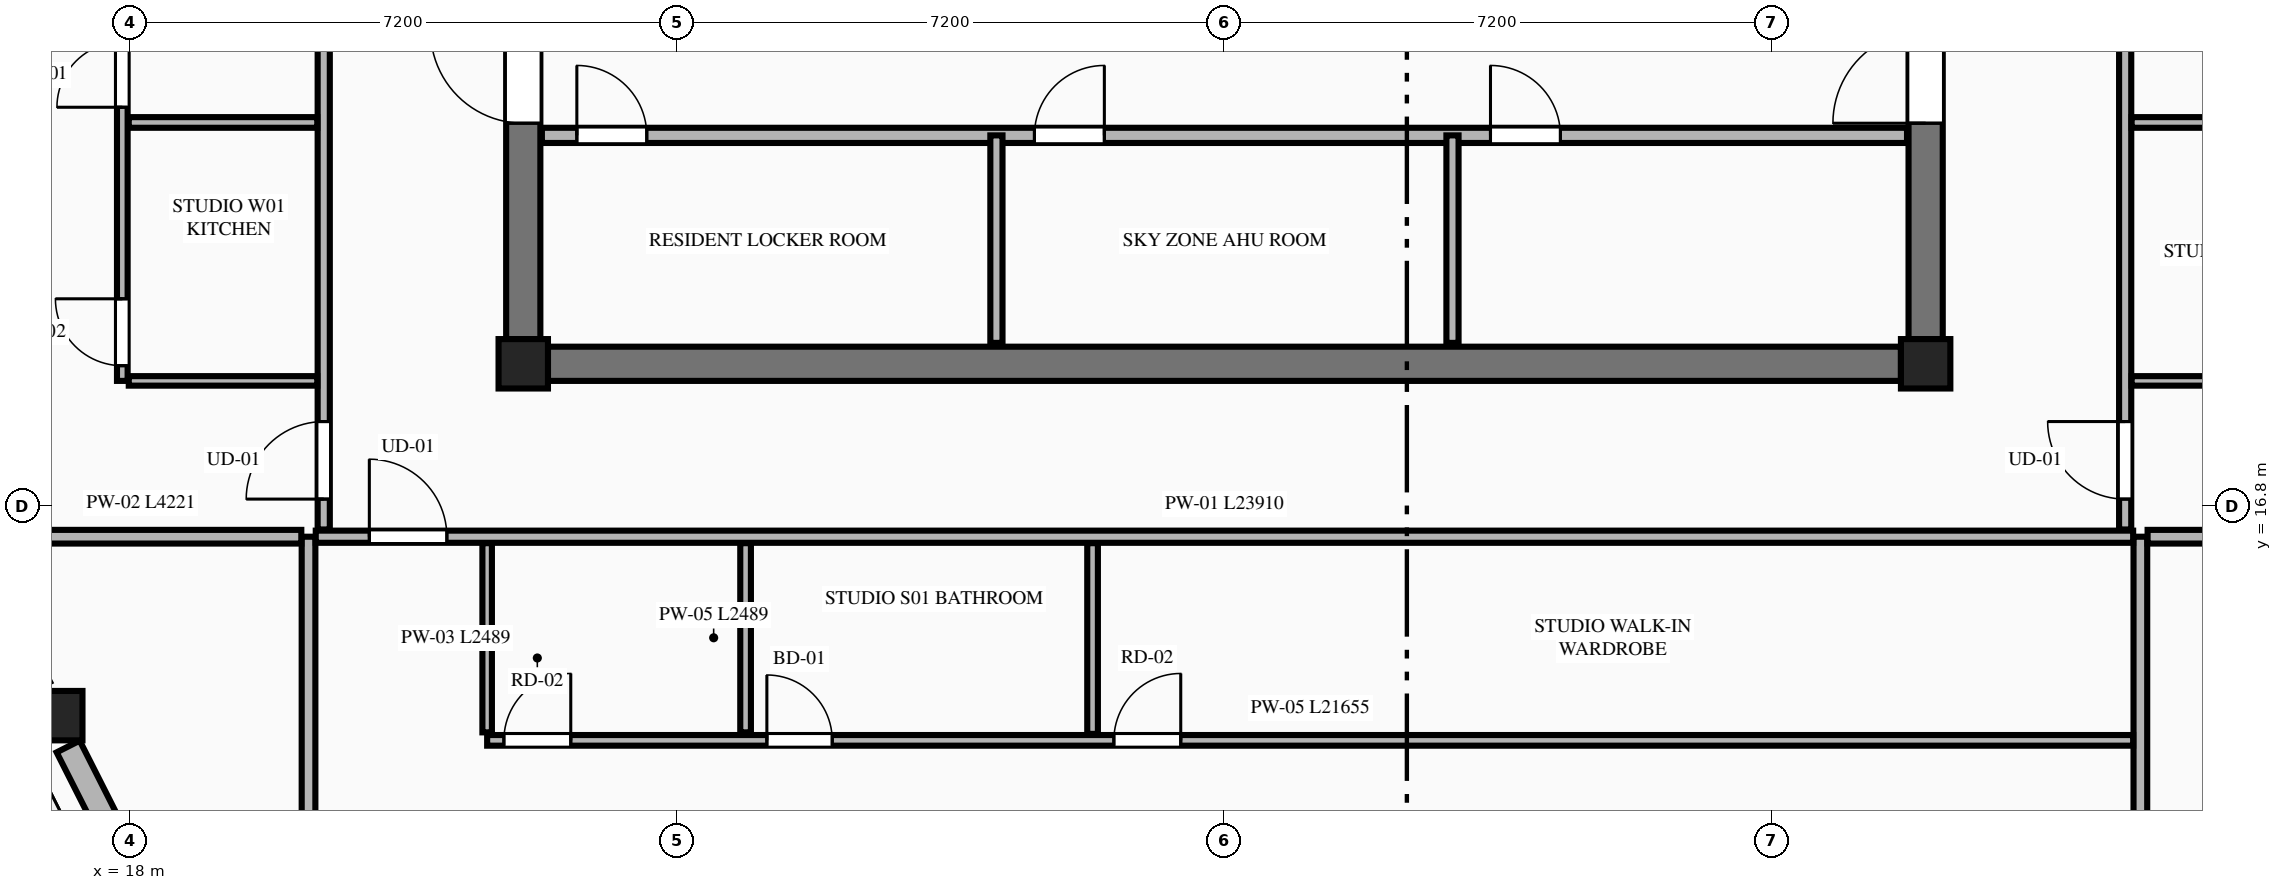
"""IFC4 building model, lengths in metres.
Left out: names, types, materials, properties, quantities, classifications, styles, units other than length and angle.
Written with IfcOpenShell. Run it as: python <this file> out.ifc"""

import sys

from ifc_helpers import new_model, si_unit, direction, frame, frame_2d, origin, origin_2d, place, context, subcontext, project, spatial, rectangle, extrude, element, fill, save


model = new_model("IFC4")
c1 = context("Model", 3, precision=1e-05, world=origin(), true_north=direction((0.0, 1.0)))
c2 = subcontext(c1, "Body", "Model", "MODEL_VIEW")
j1 = project(units=[si_unit("LENGTHUNIT", "METRE"), si_unit("PLANEANGLEUNIT", "RADIAN")], contexts=[c1])
p1 = place(None, origin())
s1 = spatial("IfcSite", under=j1, at=p1, CompositionType="ELEMENT")
p2 = place(p1, origin())
s2 = spatial("IfcBuilding", under=s1, at=p2, CompositionType="ELEMENT")
p3 = place(p2, frame((0.0, 0.0, 263.5)))
s3 = spatial("IfcBuildingStorey", under=s2, at=p3, CompositionType="ELEMENT", Elevation=263.5)
for number, where, z_axis, x_axis in (
    (1, (23.175, 18.675, 0.0), (0.0, 0.0, 1.0), (1.0, 0.0, 0.0)),
    (2, (41.625, 18.675, 0.0), (0.0, 0.0, 1.0), (1.0, 0.0, 0.0)),
):
    element("IfcColumn", number, at=place(p3, frame(where, z_axis=z_axis, x_axis=x_axis)), inside=s3, PredefinedType="COLUMN", context=c2, shape_type="SweptSolid", body=[
        extrude(rectangle(XDim=0.65, YDim=0.65, at=origin_2d()), origin(), (0.0, 0.0, 1.0), 3.65),
    ])
p4 = place(p3, frame((23.5, 18.675, 0.0), z_axis=(0.0, 0.0, 1.0), x_axis=(1.0, 0.0, 0.0)))
e3 = element("IfcWall", 3, at=p4, inside=s3, PredefinedType="SHEAR", context=c2, shape_type="SweptSolid", body=[
    extrude(rectangle(XDim=17.8, YDim=0.45, at=frame_2d((8.9, 0.0))), origin(), (0.0, 0.0, 1.0), 3.45),
])
p5 = place(p3, frame((23.175, 19.0, 0.0), z_axis=(0.0, 0.0, 1.0), x_axis=(0.0, 1.0, 0.0)))
e4 = element("IfcWall", 4, at=p5, inside=s3, PredefinedType="SHEAR", context=c2, shape_type="SweptSolid", body=[
    extrude(rectangle(XDim=13.8, YDim=0.45, at=frame_2d((6.9, 0.0))), origin(), (0.0, 0.0, 1.0), 3.45),
])
p6 = place(p5, frame((2.84, 0.0, 0.0)))
e5 = element("IfcOpeningElement", 5, at=p6, cuts=e4, PredefinedType="OPENING", context=c2, shape_type="SweptSolid", body=[
    extrude(rectangle(XDim=1.22, YDim=2.25, at=frame_2d((0.61, 1.125))), frame((0.0, 0.235, 0.0), z_axis=(0.0, -1.0, 0.0), x_axis=(1.0, 0.0, 0.0)), (0.0, 0.0, 1.0), 0.47),
])
p7 = place(p3, frame((41.625, 19.0, 0.0), z_axis=(0.0, 0.0, 1.0), x_axis=(0.0, 1.0, 0.0)))
e6 = element("IfcWall", 6, at=p7, inside=s3, PredefinedType="SHEAR", context=c2, shape_type="SweptSolid", body=[
    extrude(rectangle(XDim=13.8, YDim=0.45, at=frame_2d((6.9, 0.0))), origin(), (0.0, 0.0, 1.0), 3.45),
])
p8 = place(p7, frame((2.84, 0.0, 0.0)))
e7 = element("IfcOpeningElement", 7, at=p8, cuts=e6, PredefinedType="OPENING", context=c2, shape_type="SweptSolid", body=[
    extrude(rectangle(XDim=1.22, YDim=2.25, at=frame_2d((0.61, 1.125))), frame((0.0, 0.235, 0.0), z_axis=(0.0, -1.0, 0.0), x_axis=(1.0, 0.0, 0.0)), (0.0, 0.0, 1.0), 0.47),
])
p9 = place(p3, frame((17.051, 14.046, 0.0), z_axis=(0.0, 0.0, 1.0), x_axis=(1.0, 0.0, 0.0)))
e8 = element("IfcColumn", 8, at=p9, inside=s3, PredefinedType="COLUMN", context=c2, shape_type="SweptSolid", body=[
    extrude(rectangle(XDim=0.65, YDim=0.65, at=origin_2d()), origin(), (0.0, 0.0, 1.0), 3.65),
])
p10 = place(p3, frame((23.42, 21.68, 0.0), z_axis=(0.0, 0.0, 1.0), x_axis=(1.0, 0.0, 0.0)))
e9 = element("IfcWall", 9, at=p10, inside=s3, PredefinedType="PLUMBINGWALL", context=c2, shape_type="SweptSolid", body=[
    extrude(rectangle(XDim=17.96, YDim=0.2, at=frame_2d((8.98, 0.0))), origin(), (0.0, 0.0, 1.0), 3.45),
])
p11 = place(p10, frame((0.46, 0.0, 0.0)))
e10 = element("IfcOpeningElement", 10, at=p11, cuts=e9, PredefinedType="OPENING", context=c2, shape_type="SweptSolid", body=[
    extrude(rectangle(XDim=0.92, YDim=2.15, at=frame_2d((0.46, 1.075))), frame((0.0, 0.11, 0.0), z_axis=(0.0, -1.0, 0.0), x_axis=(1.0, 0.0, 0.0)), (0.0, 0.0, 1.0), 0.22),
])
p12 = place(p10, frame((6.48, 0.0, 0.0)))
e11 = element("IfcOpeningElement", 11, at=p12, cuts=e9, PredefinedType="OPENING", context=c2, shape_type="SweptSolid", body=[
    extrude(rectangle(XDim=0.92, YDim=2.15, at=frame_2d((0.46, 1.075))), frame((0.0, 0.11, 0.0), z_axis=(0.0, -1.0, 0.0), x_axis=(1.0, 0.0, 0.0)), (0.0, 0.0, 1.0), 0.22),
])
p13 = place(p10, frame((12.48, 0.0, 0.0)))
e12 = element("IfcOpeningElement", 12, at=p13, cuts=e9, PredefinedType="OPENING", context=c2, shape_type="SweptSolid", body=[
    extrude(rectangle(XDim=0.92, YDim=2.15, at=frame_2d((0.46, 1.075))), frame((0.0, 0.11, 0.0), z_axis=(0.0, -1.0, 0.0), x_axis=(1.0, 0.0, 0.0)), (0.0, 0.0, 1.0), 0.22),
])
for number, where, z_axis, x_axis in (
    (13, (29.4, 18.95, 0.0), (0.0, 0.0, 1.0), (0.0, 1.0, 0.0)),
    (14, (35.4, 18.95, 0.0), (0.0, 0.0, 1.0), (0.0, 1.0, 0.0)),
):
    element("IfcWall", number, at=place(p3, frame(where, z_axis=z_axis, x_axis=x_axis)), inside=s3, PredefinedType="PARTITIONING", context=c2, shape_type="SweptSolid", body=[
        extrude(rectangle(XDim=2.73, YDim=0.16, at=frame_2d((1.365, 0.0))), origin(), (0.0, 0.0, 1.0), 3.45),
    ])
p14 = place(p3, frame((17.188, 13.64, 0.0), z_axis=(0.0, 0.0, 1.0), x_axis=(0.45149770819, -0.892272278791, 0.0)))
e15 = element("IfcWall", 15, at=p14, inside=s3, PredefinedType="STANDARD", context=c2, shape_type="SweptSolid", body=[
    extrude(rectangle(XDim=4.553, YDim=0.34, at=frame_2d((2.277, 0.0))), origin(), (0.0, 0.0, 1.0), 2.983),
])
p15 = place(p14, frame((1.727, 0.0, 0.75)))
e16 = element("IfcOpeningElement", 16, at=p15, cuts=e15, PredefinedType="OPENING", context=c2, shape_type="SweptSolid", body=[
    extrude(rectangle(XDim=1.1, YDim=2.0, at=frame_2d((0.55, 1.0))), frame((0.0, 0.18, 0.0), z_axis=(0.0, -1.0, 0.0), x_axis=(1.0, 0.0, 0.0)), (0.0, 0.0, 1.0), 0.36),
])
for number, where, z_axis, x_axis in (
    (17, (20.35, 8.119, 0.0), (0.0, 0.0, 1.0), (0.0, 1.0, 0.0)),
    (18, (44.45, 8.119, 0.0), (0.0, 0.0, 1.0), (0.0, 1.0, 0.0)),
):
    element("IfcWall", number, at=place(p3, frame(where, z_axis=z_axis, x_axis=x_axis)), inside=s3, PredefinedType="PARTITIONING", context=c2, shape_type="SweptSolid", body=[
        extrude(rectangle(XDim=8.281, YDim=0.18, at=frame_2d((4.141, 0.0))), origin(), (0.0, 0.0, 1.0), 3.45),
    ])
p16 = place(p3, frame((20.445, 16.4, 0.0), z_axis=(0.0, 0.0, 1.0), x_axis=(1.0, 0.0, 0.0)))
e19 = element("IfcWall", 19, at=p16, inside=s3, PredefinedType="PARTITIONING", context=c2, shape_type="SweptSolid", body=[
    extrude(rectangle(XDim=23.91, YDim=0.16, at=frame_2d((11.955, 0.0))), origin(), (0.0, 0.0, 1.0), 3.45),
])
p17 = place(p16, frame((0.705, 0.0, 0.0)))
e20 = element("IfcOpeningElement", 20, at=p17, cuts=e19, PredefinedType="OPENING", context=c2, shape_type="SweptSolid", body=[
    extrude(rectangle(XDim=1.02, YDim=2.25, at=frame_2d((0.51, 1.125))), frame((0.0, 0.09, 0.0), z_axis=(0.0, -1.0, 0.0), x_axis=(1.0, 0.0, 0.0)), (0.0, 0.0, 1.0), 0.18),
])
p18 = place(p3, frame((22.7, 13.826, 0.0), z_axis=(0.0, 0.0, 1.0), x_axis=(0.0, 1.0, 0.0)))
e21 = element("IfcWall", 21, at=p18, inside=s3, PredefinedType="PARTITIONING", context=c2, shape_type="SweptSolid", body=[
    extrude(rectangle(XDim=2.489, YDim=0.125, at=frame_2d((1.245, 0.0))), origin(), (0.0, 0.0, 1.0), 2.907),
])
p19 = place(p3, frame((22.7, 13.721, 0.0), z_axis=(0.0, 0.0, 1.0), x_axis=(1.0, 0.0, 0.0)))
e22 = element("IfcWall", 22, at=p19, inside=s3, PredefinedType="PLUMBINGWALL", context=c2, shape_type="SweptSolid", body=[
    extrude(rectangle(XDim=21.655, YDim=0.14, at=frame_2d((10.828, 0.0))), origin(), (0.0, 0.0, 1.0), 3.45),
])
p20 = place(p19, frame((3.68, 0.0, 0.0)))
e23 = element("IfcOpeningElement", 23, at=p20, cuts=e22, PredefinedType="OPENING", context=c2, shape_type="SweptSolid", body=[
    extrude(rectangle(XDim=0.86, YDim=2.1, at=frame_2d((0.43, 1.05))), frame((0.0, 0.08, 0.0), z_axis=(0.0, -1.0, 0.0), x_axis=(1.0, 0.0, 0.0)), (0.0, 0.0, 1.0), 0.16),
])
p21 = place(p19, frame((8.245, 0.0, 0.0)))
e24 = element("IfcOpeningElement", 24, at=p21, cuts=e22, PredefinedType="OPENING", context=c2, shape_type="SweptSolid", body=[
    extrude(rectangle(XDim=0.88, YDim=2.15, at=frame_2d((0.44, 1.075))), frame((0.0, 0.08, 0.0), z_axis=(0.0, -1.0, 0.0), x_axis=(1.0, 0.0, 0.0)), (0.0, 0.0, 1.0), 0.16),
])
p22 = place(p19, frame((0.22, 0.0, 0.0)))
e25 = element("IfcOpeningElement", 25, at=p22, cuts=e22, PredefinedType="OPENING", context=c2, shape_type="SweptSolid", body=[
    extrude(rectangle(XDim=0.88, YDim=2.15, at=frame_2d((0.44, 1.075))), frame((0.0, 0.08, 0.0), z_axis=(0.0, -1.0, 0.0), x_axis=(1.0, 0.0, 0.0)), (0.0, 0.0, 1.0), 0.16),
])
p23 = place(p3, frame((26.1, 13.826, 0.0), z_axis=(0.0, 0.0, 1.0), x_axis=(0.0, 1.0, 0.0)))
e26 = element("IfcWall", 26, at=p23, inside=s3, PredefinedType="PLUMBINGWALL", context=c2, shape_type="SweptSolid", body=[
    extrude(rectangle(XDim=2.489, YDim=0.14, at=frame_2d((1.245, 0.0))), origin(), (0.0, 0.0, 1.0), 3.45),
])
p24 = place(p3, frame((30.665, 13.806, 0.0), z_axis=(0.0, 0.0, 1.0), x_axis=(0.0, 1.0, 0.0)))
e27 = element("IfcWall", 27, at=p24, inside=s3, PredefinedType="PLUMBINGWALL", context=c2, shape_type="SweptSolid", body=[
    extrude(rectangle(XDim=2.509, YDim=0.14, at=frame_2d((1.254, 0.0))), origin(), (0.0, 0.0, 1.0), 3.45),
])
p25 = place(p3, frame((16.034, 16.4, 0.0), z_axis=(0.0, 0.0, 1.0), x_axis=(1.0, 0.0, 0.0)))
e28 = element("IfcWall", 28, at=p25, inside=s3, PredefinedType="PARTITIONING", context=c2, shape_type="SweptSolid", body=[
    extrude(rectangle(XDim=4.221, YDim=0.18, at=frame_2d((2.11, 0.0))), origin(), (0.0, 0.0, 1.0), 3.45),
])
p26 = place(p3, frame((44.545, 16.4, 0.0), z_axis=(0.0, 0.0, 1.0), x_axis=(1.0, 0.0, 0.0)))
e29 = element("IfcWall", 29, at=p26, inside=s3, PredefinedType="PARTITIONING", context=c2, shape_type="SweptSolid", body=[
    extrude(rectangle(XDim=4.221, YDim=0.18, at=frame_2d((2.111, 0.0))), origin(), (0.0, 0.0, 1.0), 3.45),
])
p27 = place(p3, frame((20.55, 16.495, 0.0), z_axis=(0.0, 0.0, 1.0), x_axis=(0.0, 1.0, 0.0)))
e30 = element("IfcWall", 30, at=p27, inside=s3, PredefinedType="PARTITIONING", context=c2, shape_type="SweptSolid", body=[
    extrude(rectangle(XDim=18.41, YDim=0.16, at=frame_2d((9.205, 0.0))), origin(), (0.0, 0.0, 1.0), 3.137),
])
p28 = place(p27, frame((0.4, 0.0, 0.0)))
e31 = element("IfcOpeningElement", 31, at=p28, cuts=e30, PredefinedType="OPENING", context=c2, shape_type="SweptSolid", body=[
    extrude(rectangle(XDim=1.02, YDim=2.25, at=frame_2d((0.51, 1.125))), frame((0.0, 0.09, 0.0), z_axis=(0.0, -1.0, 0.0), x_axis=(1.0, 0.0, 0.0)), (0.0, 0.0, 1.0), 0.18),
])
p29 = place(p3, frame((17.985, 18.45, 0.0), z_axis=(0.0, 0.0, 1.0), x_axis=(1.0, 0.0, 0.0)))
e32 = element("IfcWall", 32, at=p29, inside=s3, PredefinedType="PARTITIONING", context=c2, shape_type="SweptSolid", body=[
    extrude(rectangle(XDim=2.48, YDim=0.125, at=frame_2d((1.24, 0.0))), origin(), (0.0, 0.0, 1.0), 3.45),
])
p30 = place(p3, frame((17.9, 18.45, 0.0), z_axis=(0.0, 0.0, 1.0), x_axis=(0.0, 1.0, 0.0)))
e33 = element("IfcWall", 33, at=p30, inside=s3, PredefinedType="PLUMBINGWALL", context=c2, shape_type="SweptSolid", body=[
    extrude(rectangle(XDim=16.455, YDim=0.14, at=frame_2d((8.228, 0.0))), origin(), (0.0, 0.0, 1.0), 3.45),
])
p31 = place(p30, frame((3.6, 0.0, 0.0)))
e34 = element("IfcOpeningElement", 34, at=p31, cuts=e33, PredefinedType="OPENING", context=c2, shape_type="SweptSolid", body=[
    extrude(rectangle(XDim=0.86, YDim=2.1, at=frame_2d((0.43, 1.05))), frame((0.0, 0.08, 0.0), z_axis=(0.0, -1.0, 0.0), x_axis=(1.0, 0.0, 0.0)), (0.0, 0.0, 1.0), 0.16),
])
p32 = place(p30, frame((9.187, 0.0, 0.0)))
e35 = element("IfcOpeningElement", 35, at=p32, cuts=e33, PredefinedType="OPENING", context=c2, shape_type="SweptSolid", body=[
    extrude(rectangle(XDim=0.88, YDim=2.15, at=frame_2d((0.44, 1.075))), frame((0.0, 0.08, 0.0), z_axis=(0.0, -1.0, 0.0), x_axis=(1.0, 0.0, 0.0)), (0.0, 0.0, 1.0), 0.16),
])
p33 = place(p30, frame((0.2, 0.0, 0.0)))
e36 = element("IfcOpeningElement", 36, at=p33, cuts=e33, PredefinedType="OPENING", context=c2, shape_type="SweptSolid", body=[
    extrude(rectangle(XDim=0.88, YDim=2.15, at=frame_2d((0.44, 1.075))), frame((0.0, 0.08, 0.0), z_axis=(0.0, -1.0, 0.0), x_axis=(1.0, 0.0, 0.0)), (0.0, 0.0, 1.0), 0.16),
])
p34 = place(p3, frame((17.985, 21.85, 0.0), z_axis=(0.0, 0.0, 1.0), x_axis=(1.0, 0.0, 0.0)))
e37 = element("IfcWall", 37, at=p34, inside=s3, PredefinedType="PLUMBINGWALL", context=c2, shape_type="SweptSolid", body=[
    extrude(rectangle(XDim=2.48, YDim=0.14, at=frame_2d((1.24, 0.0))), origin(), (0.0, 0.0, 1.0), 3.45),
])
p35 = place(p3, frame((44.25, 16.495, 0.0), z_axis=(0.0, 0.0, 1.0), x_axis=(0.0, 1.0, 0.0)))
e38 = element("IfcWall", 38, at=p35, inside=s3, PredefinedType="PARTITIONING", context=c2, shape_type="SweptSolid", body=[
    extrude(rectangle(XDim=18.41, YDim=0.16, at=frame_2d((9.205, 0.0))), origin(), (0.0, 0.0, 1.0), 3.137),
])
p36 = place(p35, frame((0.4, 0.0, 0.0)))
e39 = element("IfcOpeningElement", 39, at=p36, cuts=e38, PredefinedType="OPENING", context=c2, shape_type="SweptSolid", body=[
    extrude(rectangle(XDim=1.02, YDim=2.25, at=frame_2d((0.51, 1.125))), frame((0.0, 0.09, 0.0), z_axis=(0.0, -1.0, 0.0), x_axis=(1.0, 0.0, 0.0)), (0.0, 0.0, 1.0), 0.18),
])
p37 = place(p3, frame((44.335, 18.45, 0.0), z_axis=(0.0, 0.0, 1.0), x_axis=(1.0, 0.0, 0.0)))
e40 = element("IfcWall", 40, at=p37, inside=s3, PredefinedType="PARTITIONING", context=c2, shape_type="SweptSolid", body=[
    extrude(rectangle(XDim=3.68, YDim=0.125, at=frame_2d((1.84, 0.0))), origin(), (0.0, 0.0, 1.0), 3.45),
])
p38 = place(p3, frame((44.335, 21.85, 0.0), z_axis=(0.0, 0.0, 1.0), x_axis=(1.0, 0.0, 0.0)))
e41 = element("IfcWall", 41, at=p38, inside=s3, PredefinedType="PLUMBINGWALL", context=c2, shape_type="SweptSolid", body=[
    extrude(rectangle(XDim=3.68, YDim=0.14, at=frame_2d((1.84, 0.0))), origin(), (0.0, 0.0, 1.0), 3.45),
])
p39 = place(p6, origin())
e42 = element("IfcDoor", 42, at=p39, inside=s3, OperationType="SINGLE_SWING_RIGHT", PredefinedType="DOOR", context=c2, shape_type="SweptSolid", body=[
    extrude(rectangle(XDim=1.22, YDim=2.25, at=frame_2d((0.61, 1.125))), frame((0.0, 0.025, 0.0), z_axis=(0.0, -1.0, 0.0), x_axis=(1.0, 0.0, 0.0)), (0.0, 0.0, 1.0), 0.05),
])
fill(e5, e42)
p40 = place(p8, origin())
e43 = element("IfcDoor", 43, at=p40, inside=s3, OperationType="SINGLE_SWING_LEFT", PredefinedType="DOOR", context=c2, shape_type="SweptSolid", body=[
    extrude(rectangle(XDim=1.22, YDim=2.25, at=frame_2d((0.61, 1.125))), frame((0.0, 0.025, 0.0), z_axis=(0.0, -1.0, 0.0), x_axis=(1.0, 0.0, 0.0)), (0.0, 0.0, 1.0), 0.05),
])
fill(e7, e43)
p41 = place(p11, origin())
e44 = element("IfcDoor", 44, at=p41, inside=s3, OperationType="SINGLE_SWING_LEFT", PredefinedType="DOOR", context=c2, shape_type="SweptSolid", body=[
    extrude(rectangle(XDim=0.92, YDim=2.15, at=frame_2d((0.46, 1.075))), frame((0.0, 0.025, 0.0), z_axis=(0.0, -1.0, 0.0), x_axis=(1.0, 0.0, 0.0)), (0.0, 0.0, 1.0), 0.05),
])
fill(e10, e44)
p42 = place(p12, origin())
e45 = element("IfcDoor", 45, at=p42, inside=s3, OperationType="SINGLE_SWING_RIGHT", PredefinedType="DOOR", context=c2, shape_type="SweptSolid", body=[
    extrude(rectangle(XDim=0.92, YDim=2.15, at=frame_2d((0.46, 1.075))), frame((0.0, 0.025, 0.0), z_axis=(0.0, -1.0, 0.0), x_axis=(1.0, 0.0, 0.0)), (0.0, 0.0, 1.0), 0.05),
])
fill(e11, e45)
p43 = place(p13, origin())
e46 = element("IfcDoor", 46, at=p43, inside=s3, OperationType="SINGLE_SWING_LEFT", PredefinedType="DOOR", context=c2, shape_type="SweptSolid", body=[
    extrude(rectangle(XDim=0.92, YDim=2.15, at=frame_2d((0.46, 1.075))), frame((0.0, 0.025, 0.0), z_axis=(0.0, -1.0, 0.0), x_axis=(1.0, 0.0, 0.0)), (0.0, 0.0, 1.0), 0.05),
])
fill(e12, e46)
p44 = place(p20, origin())
e47 = element("IfcDoor", 47, at=p44, inside=s3, OperationType="SINGLE_SWING_LEFT", PredefinedType="DOOR", context=c2, shape_type="SweptSolid", body=[
    extrude(rectangle(XDim=0.86, YDim=2.1, at=frame_2d((0.43, 1.05))), frame((0.0, 0.025, 0.0), z_axis=(0.0, -1.0, 0.0), x_axis=(1.0, 0.0, 0.0)), (0.0, 0.0, 1.0), 0.05),
])
fill(e23, e47)
p45 = place(p21, origin())
e48 = element("IfcDoor", 48, at=p45, inside=s3, OperationType="SINGLE_SWING_RIGHT", PredefinedType="DOOR", context=c2, shape_type="SweptSolid", body=[
    extrude(rectangle(XDim=0.88, YDim=2.15, at=frame_2d((0.44, 1.075))), frame((0.0, 0.025, 0.0), z_axis=(0.0, -1.0, 0.0), x_axis=(1.0, 0.0, 0.0)), (0.0, 0.0, 1.0), 0.05),
])
fill(e24, e48)
p46 = place(p17, origin())
e49 = element("IfcDoor", 49, at=p46, inside=s3, OperationType="SINGLE_SWING_LEFT", PredefinedType="DOOR", context=c2, shape_type="SweptSolid", body=[
    extrude(rectangle(XDim=1.02, YDim=2.25, at=frame_2d((0.51, 1.125))), frame((0.0, 0.025, 0.0), z_axis=(0.0, -1.0, 0.0), x_axis=(1.0, 0.0, 0.0)), (0.0, 0.0, 1.0), 0.05),
])
fill(e20, e49)
p47 = place(p22, origin())
e50 = element("IfcDoor", 50, at=p47, inside=s3, OperationType="SINGLE_SWING_RIGHT", PredefinedType="DOOR", context=c2, shape_type="SweptSolid", body=[
    extrude(rectangle(XDim=0.88, YDim=2.15, at=frame_2d((0.44, 1.075))), frame((0.0, 0.025, 0.0), z_axis=(0.0, -1.0, 0.0), x_axis=(1.0, 0.0, 0.0)), (0.0, 0.0, 1.0), 0.05),
])
fill(e25, e50)
p48 = place(p31, origin())
e51 = element("IfcDoor", 51, at=p48, inside=s3, OperationType="SINGLE_SWING_LEFT", PredefinedType="DOOR", context=c2, shape_type="SweptSolid", body=[
    extrude(rectangle(XDim=0.86, YDim=2.1, at=frame_2d((0.43, 1.05))), frame((0.0, 0.025, 0.0), z_axis=(0.0, -1.0, 0.0), x_axis=(1.0, 0.0, 0.0)), (0.0, 0.0, 1.0), 0.05),
])
fill(e34, e51)
p49 = place(p28, origin())
e52 = element("IfcDoor", 52, at=p49, inside=s3, OperationType="SINGLE_SWING_LEFT", PredefinedType="DOOR", context=c2, shape_type="SweptSolid", body=[
    extrude(rectangle(XDim=1.02, YDim=2.25, at=frame_2d((0.51, 1.125))), frame((0.0, 0.025, 0.0), z_axis=(0.0, -1.0, 0.0), x_axis=(1.0, 0.0, 0.0)), (0.0, 0.0, 1.0), 0.05),
])
fill(e31, e52)
p50 = place(p33, origin())
e53 = element("IfcDoor", 53, at=p50, inside=s3, OperationType="SINGLE_SWING_RIGHT", PredefinedType="DOOR", context=c2, shape_type="SweptSolid", body=[
    extrude(rectangle(XDim=0.88, YDim=2.15, at=frame_2d((0.44, 1.075))), frame((0.0, 0.025, 0.0), z_axis=(0.0, -1.0, 0.0), x_axis=(1.0, 0.0, 0.0)), (0.0, 0.0, 1.0), 0.05),
])
fill(e36, e53)
p51 = place(p36, origin())
e54 = element("IfcDoor", 54, at=p51, inside=s3, OperationType="SINGLE_SWING_RIGHT", PredefinedType="DOOR", context=c2, shape_type="SweptSolid", body=[
    extrude(rectangle(XDim=1.02, YDim=2.25, at=frame_2d((0.51, 1.125))), frame((0.0, 0.025, 0.0), z_axis=(0.0, -1.0, 0.0), x_axis=(1.0, 0.0, 0.0)), (0.0, 0.0, 1.0), 0.05),
])
fill(e39, e54)
save(model, sys.argv[1])
